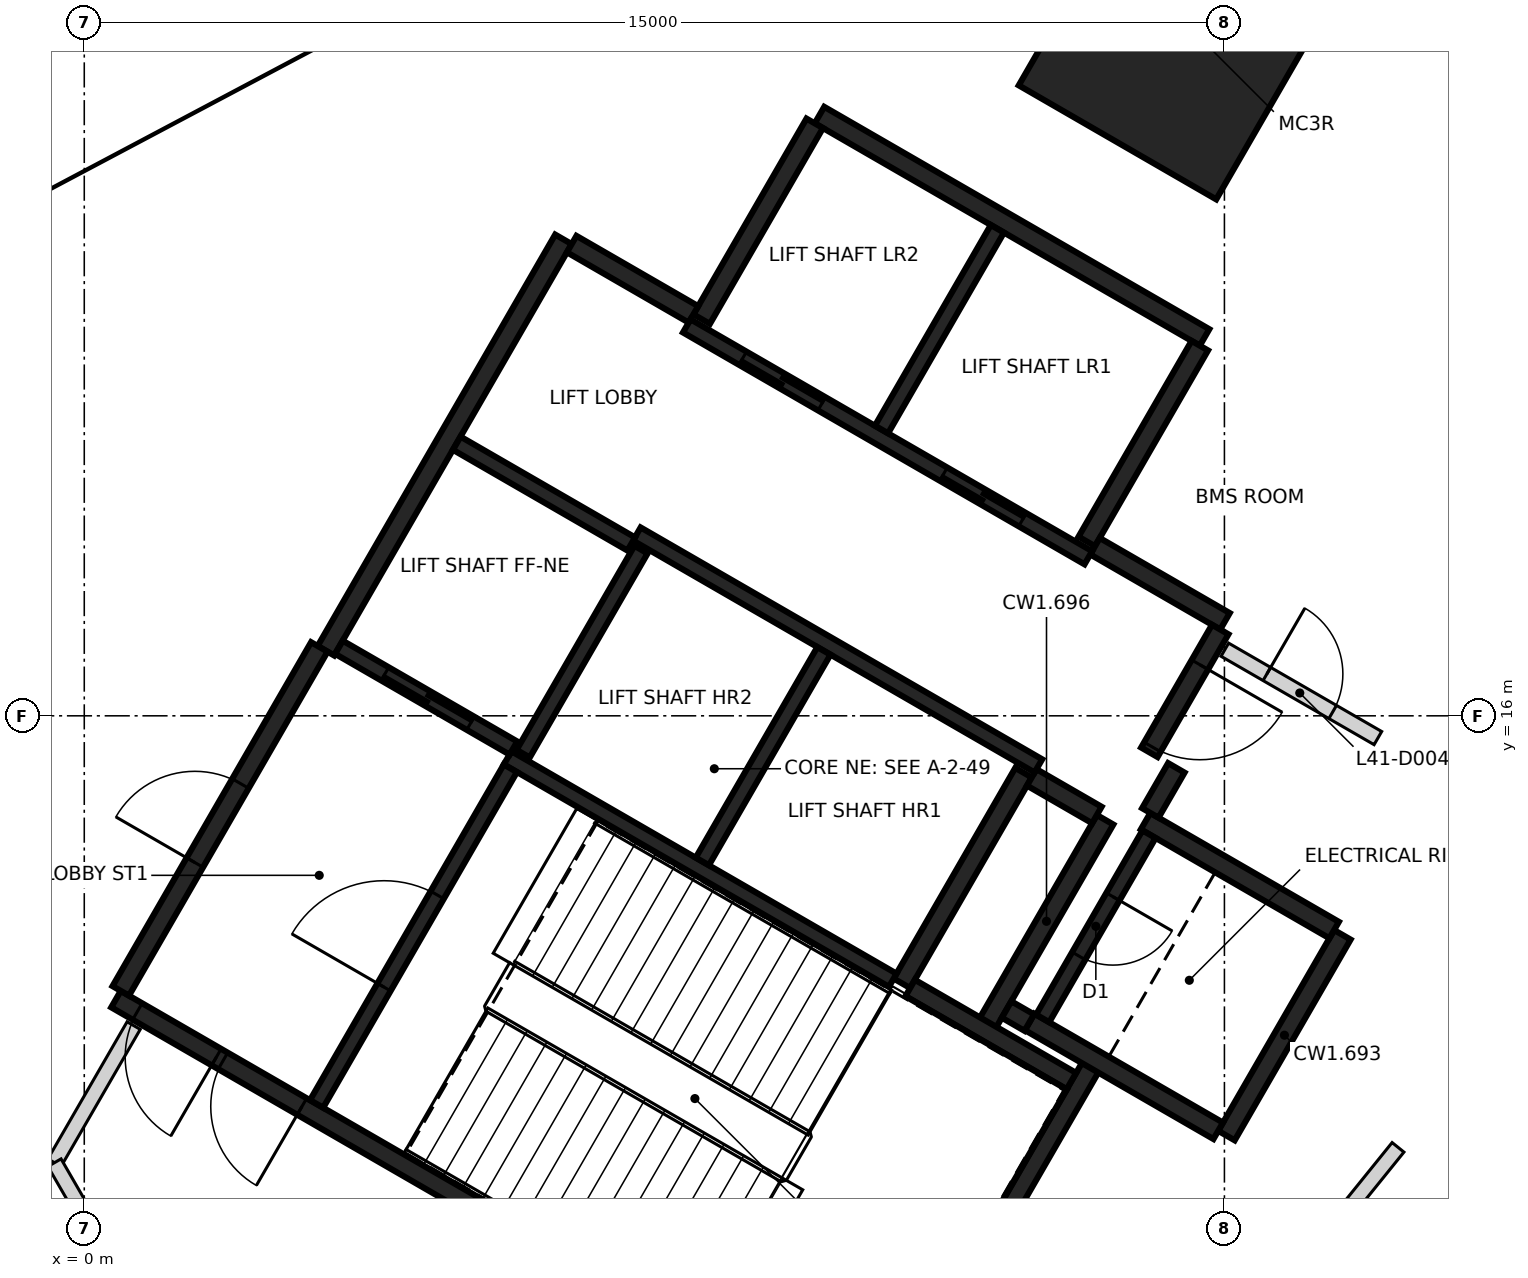
"""IFC4 building model, lengths in metres.
Left out: names, types, materials, properties, quantities, classifications, styles, units other than length and angle.
Written with IfcOpenShell. Run it as: python <this file> out.ifc"""

import sys

from ifc_helpers import new_model, si_unit, direction, frame, frame_2d, origin, origin_2d, place, context, subcontext, project, spatial, rectangle, extrude, element, fill, save


model = new_model("IFC4")
c1 = context("Model", 3, precision=1e-05, world=origin(), true_north=direction((0.0, 1.0)))
c2 = subcontext(c1, "Body", "Model", "MODEL_VIEW")
j1 = project(units=[si_unit("LENGTHUNIT", "METRE"), si_unit("PLANEANGLEUNIT", "RADIAN")], contexts=[c1])
p1 = place(None, origin())
s1 = spatial("IfcSite", under=j1, at=p1, CompositionType="ELEMENT")
p2 = place(p1, origin())
s2 = spatial("IfcBuilding", under=s1, at=p2, CompositionType="ELEMENT")
p3 = place(p2, frame((0.0, 0.0, 164.8)))
s3 = spatial("IfcBuildingStorey", under=s2, at=p3, CompositionType="ELEMENT", Elevation=164.8)
p4 = place(p3, frame((14.493, 25.103, -0.4), z_axis=(0.0, 0.0, 1.0), x_axis=(0.5, 0.866025403784, 0.0)))
e1 = element("IfcColumn", 1, at=p4, inside=s3, PredefinedType="COLUMN", context=c2, shape_type="SweptSolid", body=[
    extrude(rectangle(XDim=3.6, YDim=3.0, at=origin_2d()), origin(), (0.0, 0.0, 1.0), 4.85),
])
p5 = place(p3, frame((10.42, 6.498, 0.0), z_axis=(0.0, 0.0, 1.0), x_axis=(-0.866021906294, 0.500006057782, 0.0)))
e2 = element("IfcWall", 2, at=p5, inside=s3, PredefinedType="SHEAR", context=c2, shape_type="SweptSolid", body=[
    extrude(rectangle(XDim=11.55, YDim=0.25, at=frame_2d((5.775, 0.0))), origin(), (0.0, 0.0, 1.0), 4.45),
])
p6 = place(p5, frame((10.025, 0.0, 0.0)))
e3 = element("IfcOpeningElement", 3, at=p6, cuts=e2, PredefinedType="OPENING", context=c2, shape_type="SweptSolid", body=[
    extrude(rectangle(XDim=1.2, YDim=2.1, at=frame_2d((0.6, 1.05))), frame((0.0, 0.135, 0.0), z_axis=(0.0, -1.0, 0.0), x_axis=(1.0, 0.0, 0.0)), (0.0, 0.0, 1.0), 0.27),
])
p7 = place(p5, frame((8.725, 0.0, 0.0)))
e4 = element("IfcOpeningElement", 4, at=p7, cuts=e2, PredefinedType="OPENING", context=c2, shape_type="SweptSolid", body=[
    extrude(rectangle(XDim=1.2, YDim=2.1, at=frame_2d((0.6, 1.05))), frame((0.0, 0.135, 0.0), z_axis=(0.0, -1.0, 0.0), x_axis=(1.0, 0.0, 0.0)), (0.0, 0.0, 1.0), 0.27),
])
p8 = place(p3, frame((3.179, 16.856, 0.0), z_axis=(0.0, 0.0, 1.0), x_axis=(0.500004234368, 0.866022959057, 0.0)))
e5 = element("IfcWall", 5, at=p8, inside=s3, PredefinedType="SHEAR", context=c2, shape_type="SweptSolid", body=[
    extrude(rectangle(XDim=6.25, YDim=0.25, at=frame_2d((3.125, 0.0))), origin(), (0.0, 0.0, 1.0), 4.45),
])
p9 = place(p3, frame((9.673, 23.903, 0.0), z_axis=(0.0, 0.0, 1.0), x_axis=(0.86603616409, -0.499981362141, 0.0)))
e6 = element("IfcWall", 6, at=p9, inside=s3, PredefinedType="SHEAR", context=c2, shape_type="SweptSolid", body=[
    extrude(rectangle(XDim=5.85, YDim=0.25, at=frame_2d((2.925, 0.0))), origin(), (0.0, 0.0, 1.0), 4.45),
])
p10 = place(p3, frame((0.48, 12.381, 0.0), z_axis=(0.0, 0.0, 1.0), x_axis=(0.49999885962, 0.866026062182, 0.0)))
e7 = element("IfcWall", 7, at=p10, inside=s3, PredefinedType="SHEAR", context=c2, shape_type="SweptSolid", body=[
    extrude(rectangle(XDim=5.225, YDim=0.25, at=frame_2d((2.612, 0.0))), origin(), (0.0, 0.0, 1.0), 4.45),
])
p11 = place(p10, frame((1.95, 0.0, 0.0)))
e8 = element("IfcOpeningElement", 8, at=p11, cuts=e7, PredefinedType="OPENING", context=c2, shape_type="SweptSolid", body=[
    extrude(rectangle(XDim=1.2, YDim=2.1, at=frame_2d((0.6, 1.05))), frame((0.0, 0.135, 0.0), z_axis=(0.0, -1.0, 0.0), x_axis=(1.0, 0.0, 0.0)), (0.0, 0.0, 1.0), 0.27),
])
p12 = place(p3, frame((13.238, 11.378, 0.0), z_axis=(0.0, 0.0, 1.0), x_axis=(-0.500008851346, -0.866020293397, 0.0)))
e9 = element("IfcWall", 9, at=p12, inside=s3, PredefinedType="SHEAR", context=c2, shape_type="SweptSolid", body=[
    extrude(rectangle(XDim=5.51, YDim=0.25, at=frame_2d((2.755, 0.0))), origin(), (0.0, 0.0, 1.0), 4.45),
])
p13 = place(p3, frame((12.357, 15.252, 0.0), z_axis=(0.0, 0.0, 1.0), x_axis=(-0.500028443584, -0.866008981251, 0.0)))
e10 = element("IfcWall", 10, at=p13, inside=s3, PredefinedType="SHEAR", context=c2, shape_type="SweptSolid", body=[
    extrude(rectangle(XDim=3.2, YDim=0.25, at=frame_2d((1.6, 0.0))), origin(), (0.0, 0.0, 1.0), 4.45),
])
for number, where, z_axis, x_axis in (
    (11, (8.123, 21.219, 0.0), (0.0, 0.0, 1.0), (0.5, 0.866, 0.0)),
    (12, (14.676, 20.87, 0.0), (0.0, 0.0, 1.0), (-0.5, -0.866, 0.0)),
):
    element("IfcWall", number, at=place(p3, frame(where, z_axis=z_axis, x_axis=x_axis)), inside=s3, PredefinedType="SHEAR", context=c2, shape_type="SweptSolid", body=[
        extrude(rectangle(XDim=2.975, YDim=0.25, at=frame_2d((1.487, 0.0))), origin(), (0.0, 0.0, 1.0), 4.45),
    ])
p14 = place(p3, frame((16.552, 13.119, 0.0), z_axis=(0.0, 0.0, 1.0), x_axis=(-0.499978833458, -0.866037623948, 0.0)))
e13 = element("IfcWall", 13, at=p14, inside=s3, PredefinedType="SHEAR", context=c2, shape_type="SweptSolid", body=[
    extrude(rectangle(XDim=3.05, YDim=0.25, at=frame_2d((1.525, 0.0))), origin(), (0.0, 0.0, 1.0), 4.45),
])
p15 = place(p3, frame((14.918, 10.54, 0.0), z_axis=(0.0, 0.0, 1.0), x_axis=(-0.866063538972, 0.499933942099, 0.0)))
e14 = element("IfcWall", 14, at=p15, inside=s3, PredefinedType="SHEAR", context=c2, shape_type="SweptSolid", body=[
    extrude(rectangle(XDim=2.865, YDim=0.25, at=frame_2d((1.432, 0.0))), origin(), (0.0, 0.0, 1.0), 4.45),
])
p16 = place(p3, frame((13.963, 14.614, 0.0), z_axis=(0.0, 0.0, 1.0), x_axis=(0.866042235819, -0.499970844928, 0.0)))
e15 = element("IfcWall", 15, at=p16, inside=s3, PredefinedType="SHEAR", context=c2, shape_type="SweptSolid", body=[
    extrude(rectangle(XDim=2.865, YDim=0.25, at=frame_2d((1.432, 0.0))), origin(), (0.0, 0.0, 1.0), 4.45),
])
p17 = place(p3, frame((11.888, 11.961, 0.0), z_axis=(0.0, 0.0, 1.0), x_axis=(0.500003324108, 0.866023484601, 0.0)))
e16 = element("IfcWall", 16, at=p17, inside=s3, PredefinedType="SHEAR", context=c2, shape_type="SweptSolid", body=[
    extrude(rectangle(XDim=3.085, YDim=0.25, at=frame_2d((1.542, 0.0))), origin(), (0.0, 0.0, 1.0), 4.45),
])
p18 = place(p3, frame((10.865, 12.418, 0.0), z_axis=(0.0, 0.0, 1.0), x_axis=(0.866026229868, -0.499998569178, 0.0)))
e17 = element("IfcWall", 17, at=p18, inside=s3, PredefinedType="SHEAR", context=c2, shape_type="SweptSolid", body=[
    extrude(rectangle(XDim=2.449, YDim=0.25, at=frame_2d((1.225, 0.0))), origin(), (0.0, 0.0, 1.0), 4.45),
])
p19 = place(p3, frame((13.297, 18.231, 0.0), z_axis=(0.0, 0.0, 1.0), x_axis=(0.866043531843, -0.499968599967, 0.0)))
e18 = element("IfcWall", 18, at=p19, inside=s3, PredefinedType="SHEAR", context=c2, shape_type="SweptSolid", body=[
    extrude(rectangle(XDim=1.975, YDim=0.25, at=frame_2d((0.987, 0.0))), origin(), (0.0, 0.0, 1.0), 4.45),
])
p20 = place(p3, frame((6.413, 22.206, 0.0), z_axis=(0.0, 0.0, 1.0), x_axis=(0.866016279763, -0.500015802937, 0.0)))
e19 = element("IfcWall", 19, at=p20, inside=s3, PredefinedType="SHEAR", context=c2, shape_type="SweptSolid", body=[
    extrude(rectangle(XDim=1.849, YDim=0.25, at=frame_2d((0.925, 0.0))), origin(), (0.0, 0.0, 1.0), 4.45),
])
p21 = place(p3, frame((14.945, 17.135, 0.0), z_axis=(0.0, 0.0, 1.0), x_axis=(-0.499983108224, -0.866035156036, 0.0)))
e20 = element("IfcWall", 20, at=p21, inside=s3, PredefinedType="SHEAR", context=c2, shape_type="SweptSolid", body=[
    extrude(rectangle(XDim=1.865, YDim=0.25, at=frame_2d((0.932, 0.0))), origin(), (0.0, 0.0, 1.0), 4.45),
])
p22 = place(p21, frame((0.535, 0.0, 0.0)))
e21 = element("IfcOpeningElement", 21, at=p22, cuts=e20, PredefinedType="OPENING", context=c2, shape_type="SweptSolid", body=[
    extrude(rectangle(XDim=1.25, YDim=2.1, at=frame_2d((0.625, 1.05))), frame((0.0, 0.135, 0.0), z_axis=(0.0, -1.0, 0.0), x_axis=(1.0, 0.0, 0.0)), (0.0, 0.0, 1.0), 0.27),
])
p23 = place(p3, frame((13.322, 14.695, 0.0), z_axis=(0.0, 0.0, 1.0), x_axis=(-0.866017078145, 0.500014420154, 0.0)))
e22 = element("IfcWall", 22, at=p23, inside=s3, PredefinedType="SHEAR", context=c2, shape_type="SweptSolid", body=[
    extrude(rectangle(XDim=0.989, YDim=0.25, at=frame_2d((0.495, 0.0))), origin(), (0.0, 0.0, 1.0), 4.45),
])
p24 = place(p3, frame((14.368, 15.315, 0.0), z_axis=(0.0, 0.0, 1.0), x_axis=(-0.499897359611, -0.866084655132, 0.0)))
e23 = element("IfcWall", 23, at=p24, inside=s3, PredefinedType="SHEAR", context=c2, shape_type="SweptSolid", body=[
    extrude(rectangle(XDim=0.685, YDim=0.25, at=frame_2d((0.342, 0.0))), origin(), (0.0, 0.0, 1.0), 4.45),
])
p25 = place(p3, frame((12.433, 11.964, 0.0), z_axis=(0.0, 0.0, 1.0), x_axis=(-0.866055875208, 0.499947218231, 0.0)))
e24 = element("IfcWall", 24, at=p25, inside=s3, PredefinedType="SHEAR", context=c2, shape_type="SweptSolid", body=[
    extrude(rectangle(XDim=0.345, YDim=0.25, at=frame_2d((0.172, 0.0))), origin(), (0.0, 0.0, 1.0), 4.45),
])
p26 = place(p3, frame((13.21, 18.08, 0.0), z_axis=(0.0, 0.0, 1.0), x_axis=(-0.866030299012, 0.499991521122, 0.0)))
e25 = element("IfcWall", 25, at=p26, inside=s3, PredefinedType="SHEAR", context=c2, shape_type="SweptSolid", body=[
    extrude(rectangle(XDim=6.1, YDim=0.2, at=frame_2d((3.05, 0.0))), origin(), (0.0, 0.0, 1.0), 4.45),
])
p27 = place(p26, frame((1.0, 0.0, 0.0)))
e26 = element("IfcOpeningElement", 26, at=p27, cuts=e25, PredefinedType="OPENING", context=c2, shape_type="SweptSolid", body=[
    extrude(rectangle(XDim=1.2, YDim=2.1, at=frame_2d((0.6, 1.05))), frame((0.0, 0.11, 0.0), z_axis=(0.0, -1.0, 0.0), x_axis=(1.0, 0.0, 0.0)), (0.0, 0.0, 1.0), 0.22),
])
p28 = place(p26, frame((4.05, 0.0, 0.0)))
e27 = element("IfcOpeningElement", 27, at=p28, cuts=e25, PredefinedType="OPENING", context=c2, shape_type="SweptSolid", body=[
    extrude(rectangle(XDim=1.2, YDim=2.1, at=frame_2d((0.6, 1.05))), frame((0.0, 0.11, 0.0), z_axis=(0.0, -1.0, 0.0), x_axis=(1.0, 0.0, 0.0)), (0.0, 0.0, 1.0), 0.22),
])
p29 = place(p3, frame((12.552, 15.342, 0.0), z_axis=(0.0, 0.0, 1.0), x_axis=(-0.866030299012, 0.499991521122, 0.0)))
e28 = element("IfcWall", 28, at=p29, inside=s3, PredefinedType="SHEAR", context=c2, shape_type="SweptSolid", body=[
    extrude(rectangle(XDim=6.1, YDim=0.2, at=frame_2d((3.05, 0.0))), origin(), (0.0, 0.0, 1.0), 4.45),
])
p30 = place(p3, frame((10.636, 12.521, 0.0), z_axis=(0.0, 0.0, 1.0), x_axis=(-0.866013252188, 0.500021046592, 0.0)))
e29 = element("IfcWall", 29, at=p30, inside=s3, PredefinedType="SHEAR", context=c2, shape_type="SweptSolid", body=[
    extrude(rectangle(XDim=5.851, YDim=0.2, at=frame_2d((2.925, 0.0))), origin(), (0.0, 0.0, 1.0), 4.45),
])
p31 = place(p3, frame((3.057, 10.895, 0.0), z_axis=(0.0, 0.0, 1.0), x_axis=(0.500027839223, 0.866009330205, 0.0)))
e30 = element("IfcWall", 30, at=p31, inside=s3, PredefinedType="SHEAR", context=c2, shape_type="SweptSolid", body=[
    extrude(rectangle(XDim=5.098, YDim=0.2, at=frame_2d((2.549, 0.0))), origin(), (0.0, 0.0, 1.0), 4.45),
])
p32 = place(p31, frame((1.774, 0.0, 0.0)))
e31 = element("IfcOpeningElement", 31, at=p32, cuts=e30, PredefinedType="OPENING", context=c2, shape_type="SweptSolid", body=[
    extrude(rectangle(XDim=1.4, YDim=2.1, at=frame_2d((0.7, 1.05))), frame((0.0, 0.11, 0.0), z_axis=(0.0, -1.0, 0.0), x_axis=(1.0, 0.0, 0.0)), (0.0, 0.0, 1.0), 0.22),
])
p33 = place(p3, frame((8.132, 14.084, 0.0), z_axis=(0.0, 0.0, 1.0), x_axis=(0.500030834389, 0.86600760081, 0.0)))
e32 = element("IfcWall", 32, at=p33, inside=s3, PredefinedType="SHEAR", context=c2, shape_type="SweptSolid", body=[
    extrude(rectangle(XDim=3.198, YDim=0.2, at=frame_2d((1.599, 0.0))), origin(), (0.0, 0.0, 1.0), 4.45),
])
p34 = place(p3, frame((10.489, 19.767, 0.0), z_axis=(0.0, 0.0, 1.0), x_axis=(0.499946628782, 0.866056215479, 0.0)))
e33 = element("IfcWall", 33, at=p34, inside=s3, PredefinedType="SHEAR", context=c2, shape_type="SweptSolid", body=[
    extrude(rectangle(XDim=3.048, YDim=0.2, at=frame_2d((1.524, 0.0))), origin(), (0.0, 0.0, 1.0), 4.45),
])
p35 = place(p3, frame((14.008, 14.442, 0.0), z_axis=(0.0, 0.0, 1.0), x_axis=(-0.499986818241, -0.866033014143, 0.0)))
e34 = element("IfcWall", 34, at=p35, inside=s3, PredefinedType="SHEAR", context=c2, shape_type="SweptSolid", body=[
    extrude(rectangle(XDim=2.798, YDim=0.2, at=frame_2d((1.399, 0.0))), origin(), (0.0, 0.0, 1.0), 4.45),
])
p36 = place(p35, frame((0.949, 0.0, 0.0)))
e35 = element("IfcOpeningElement", 35, at=p36, cuts=e34, PredefinedType="OPENING", context=c2, shape_type="SweptSolid", body=[
    extrude(rectangle(XDim=0.9, YDim=2.1, at=frame_2d((0.45, 1.05))), frame((0.0, 0.11, 0.0), z_axis=(0.0, -1.0, 0.0), x_axis=(1.0, 0.0, 0.0)), (0.0, 0.0, 1.0), 0.22),
])
p37 = place(p3, frame((7.324, 18.187, 0.0), z_axis=(0.0, 0.0, 1.0), x_axis=(-0.499967891604, -0.866043940782, 0.0)))
e36 = element("IfcWall", 36, at=p37, inside=s3, PredefinedType="SHEAR", context=c2, shape_type="SweptSolid", body=[
    extrude(rectangle(XDim=3.1, YDim=0.2, at=frame_2d((1.55, 0.0))), origin(), (0.0, 0.0, 1.0), 4.45),
])
p38 = place(p3, frame((5.646, 15.576, 0.0), z_axis=(0.0, 0.0, 1.0), x_axis=(-0.866018407898, 0.500012117035, 0.0)))
e37 = element("IfcWall", 37, at=p38, inside=s3, PredefinedType="SHEAR", context=c2, shape_type="SweptSolid", body=[
    extrude(rectangle(XDim=2.651, YDim=0.2, at=frame_2d((1.325, 0.0))), origin(), (0.0, 0.0, 1.0), 4.45),
])
p39 = place(p38, frame((0.652, 0.0, 0.0)))
e38 = element("IfcOpeningElement", 38, at=p39, cuts=e37, PredefinedType="OPENING", context=c2, shape_type="SweptSolid", body=[
    extrude(rectangle(XDim=1.3, YDim=2.1, at=frame_2d((0.65, 1.05))), frame((0.0, 0.11, 0.0), z_axis=(0.0, -1.0, 0.0), x_axis=(1.0, 0.0, 0.0)), (0.0, 0.0, 1.0), 0.22),
])
p40 = place(p3, frame((7.196, 18.26, 0.0), z_axis=(0.0, 0.0, 1.0), x_axis=(-0.866018407898, 0.500012117035, 0.0)))
e39 = element("IfcWall", 39, at=p40, inside=s3, PredefinedType="SHEAR", context=c2, shape_type="SweptSolid", body=[
    extrude(rectangle(XDim=2.651, YDim=0.2, at=frame_2d((1.325, 0.0))), origin(), (0.0, 0.0, 1.0), 4.45),
])
p41 = place(p3, frame((-0.392, 10.121, 0.0), z_axis=(0.0, 0.0, 1.0), x_axis=(0.50017216111, 0.865925983702, 0.0)))
e40 = element("IfcWall", 40, at=p41, inside=s3, PredefinedType="PARTITIONING", context=c2, shape_type="SweptSolid", body=[
    extrude(rectangle(XDim=2.083, YDim=0.2, at=frame_2d((1.042, 0.0))), origin(), (0.0, 0.0, 1.0), 4.45),
])
p42 = place(p3, frame((-0.392, 10.121, 0.0), z_axis=(0.0, 0.0, 1.0), x_axis=(0.500238339471, -0.86588775469, 0.0)))
e41 = element("IfcWall", 41, at=p42, inside=s3, PredefinedType="PARTITIONING", context=c2, shape_type="SweptSolid", body=[
    extrude(rectangle(XDim=1.761, YDim=0.2, at=frame_2d((0.881, 0.0))), origin(), (0.0, 0.0, 1.0), 4.45),
])
p43 = place(p3, frame((15.005, 16.87, 0.0), z_axis=(0.0, 0.0, 1.0), x_axis=(0.866005508897, -0.500034457374, 0.0)))
e42 = element("IfcWall", 42, at=p43, inside=s3, PredefinedType="PARTITIONING", context=c2, shape_type="SweptSolid", body=[
    extrude(rectangle(XDim=2.325, YDim=0.2, at=frame_2d((1.163, 0.0))), origin(), (0.0, 0.0, 1.0), 4.45),
])
p44 = place(p43, frame((0.639, 0.0, 0.0)))
e43 = element("IfcOpeningElement", 43, at=p44, cuts=e42, PredefinedType="OPENING", context=c2, shape_type="SweptSolid", body=[
    extrude(rectangle(XDim=1.0, YDim=2.1, at=frame_2d((0.5, 1.05))), frame((0.0, 0.11, 0.0), z_axis=(0.0, -1.0, 0.0), x_axis=(1.0, 0.0, 0.0)), (0.0, 0.0, 1.0), 0.22),
])
p45 = place(p3, frame((16.625, 9.507, 0.0), z_axis=(0.0, 0.0, 1.0), x_axis=(0.628293758017, 0.777976190919, 0.0)))
e44 = element("IfcWall", 44, at=p45, inside=s3, PredefinedType="PARTITIONING", context=c2, shape_type="SweptSolid", body=[
    extrude(rectangle(XDim=1.049, YDim=0.2, at=frame_2d((0.524, 0.0))), origin(), (0.0, 0.0, 1.0), 4.45),
])
p46 = place(p39, origin())
e45 = element("IfcDoor", 45, at=p46, inside=s3, OperationType="SLIDING_TO_RIGHT", PredefinedType="DOOR", context=c2, shape_type="SweptSolid", body=[
    extrude(rectangle(XDim=1.3, YDim=2.1, at=frame_2d((0.65, 1.05))), frame((0.0, 0.025, 0.0), z_axis=(0.0, -1.0, 0.0), x_axis=(1.0, 0.0, 0.0)), (0.0, 0.0, 1.0), 0.05),
])
fill(e38, e45)
p47 = place(p27, origin())
e46 = element("IfcDoor", 46, at=p47, inside=s3, OperationType="DOUBLE_DOOR_SLIDING", PredefinedType="DOOR", context=c2, shape_type="SweptSolid", body=[
    extrude(rectangle(XDim=1.2, YDim=2.1, at=frame_2d((0.6, 1.05))), frame((0.0, 0.025, 0.0), z_axis=(0.0, -1.0, 0.0), x_axis=(1.0, 0.0, 0.0)), (0.0, 0.0, 1.0), 0.05),
])
fill(e26, e46)
p48 = place(p28, origin())
e47 = element("IfcDoor", 47, at=p48, inside=s3, OperationType="DOUBLE_DOOR_SLIDING", PredefinedType="DOOR", context=c2, shape_type="SweptSolid", body=[
    extrude(rectangle(XDim=1.2, YDim=2.1, at=frame_2d((0.6, 1.05))), frame((0.0, 0.025, 0.0), z_axis=(0.0, -1.0, 0.0), x_axis=(1.0, 0.0, 0.0)), (0.0, 0.0, 1.0), 0.05),
])
fill(e27, e47)
p49 = place(p22, origin())
e48 = element("IfcDoor", 48, at=p49, inside=s3, OperationType="SINGLE_SWING_LEFT", PredefinedType="DOOR", context=c2, shape_type="SweptSolid", body=[
    extrude(rectangle(XDim=1.25, YDim=2.1, at=frame_2d((0.625, 1.05))), frame((0.0, 0.025, 0.0), z_axis=(0.0, -1.0, 0.0), x_axis=(1.0, 0.0, 0.0)), (0.0, 0.0, 1.0), 0.05),
])
fill(e21, e48)
p50 = place(p6, origin())
e49 = element("IfcDoor", 49, at=p50, inside=s3, OperationType="SINGLE_SWING_LEFT", PredefinedType="DOOR", context=c2, shape_type="SweptSolid", body=[
    extrude(rectangle(XDim=1.2, YDim=2.1, at=frame_2d((0.6, 1.05))), frame((0.0, 0.025, 0.0), z_axis=(0.0, -1.0, 0.0), x_axis=(1.0, 0.0, 0.0)), (0.0, 0.0, 1.0), 0.05),
])
fill(e3, e49)
p51 = place(p7, origin())
e50 = element("IfcDoor", 50, at=p51, inside=s3, OperationType="SINGLE_SWING_RIGHT", PredefinedType="DOOR", context=c2, shape_type="SweptSolid", body=[
    extrude(rectangle(XDim=1.2, YDim=2.1, at=frame_2d((0.6, 1.05))), frame((0.0, 0.025, 0.0), z_axis=(0.0, -1.0, 0.0), x_axis=(1.0, 0.0, 0.0)), (0.0, 0.0, 1.0), 0.05),
])
fill(e4, e50)
p52 = place(p32, origin())
e51 = element("IfcDoor", 51, at=p52, inside=s3, OperationType="SINGLE_SWING_RIGHT", PredefinedType="DOOR", context=c2, shape_type="SweptSolid", body=[
    extrude(rectangle(XDim=1.4, YDim=2.1, at=frame_2d((0.7, 1.05))), frame((0.0, 0.025, 0.0), z_axis=(0.0, -1.0, 0.0), x_axis=(1.0, 0.0, 0.0)), (0.0, 0.0, 1.0), 0.05),
])
fill(e31, e51)
p53 = place(p36, origin())
e52 = element("IfcDoor", 52, at=p53, inside=s3, OperationType="SINGLE_SWING_LEFT", PredefinedType="DOOR", context=c2, shape_type="SweptSolid", body=[
    extrude(rectangle(XDim=0.9, YDim=2.1, at=frame_2d((0.45, 1.05))), frame((0.0, 0.025, 0.0), z_axis=(0.0, -1.0, 0.0), x_axis=(1.0, 0.0, 0.0)), (0.0, 0.0, 1.0), 0.05),
])
fill(e35, e52)
p54 = place(p11, origin())
e53 = element("IfcDoor", 53, at=p54, inside=s3, OperationType="SINGLE_SWING_LEFT", PredefinedType="DOOR", context=c2, shape_type="SweptSolid", body=[
    extrude(rectangle(XDim=1.2, YDim=2.1, at=frame_2d((0.6, 1.05))), frame((0.0, 0.025, 0.0), z_axis=(0.0, -1.0, 0.0), x_axis=(1.0, 0.0, 0.0)), (0.0, 0.0, 1.0), 0.05),
])
fill(e8, e53)
p55 = place(p44, origin())
e54 = element("IfcDoor", 54, at=p55, inside=s3, OperationType="SINGLE_SWING_LEFT", PredefinedType="DOOR", context=c2, shape_type="SweptSolid", body=[
    extrude(rectangle(XDim=1.0, YDim=2.1, at=frame_2d((0.5, 1.05))), frame((0.0, 0.025, 0.0), z_axis=(0.0, -1.0, 0.0), x_axis=(1.0, 0.0, 0.0)), (0.0, 0.0, 1.0), 0.05),
])
fill(e43, e54)
save(model, sys.argv[1])
